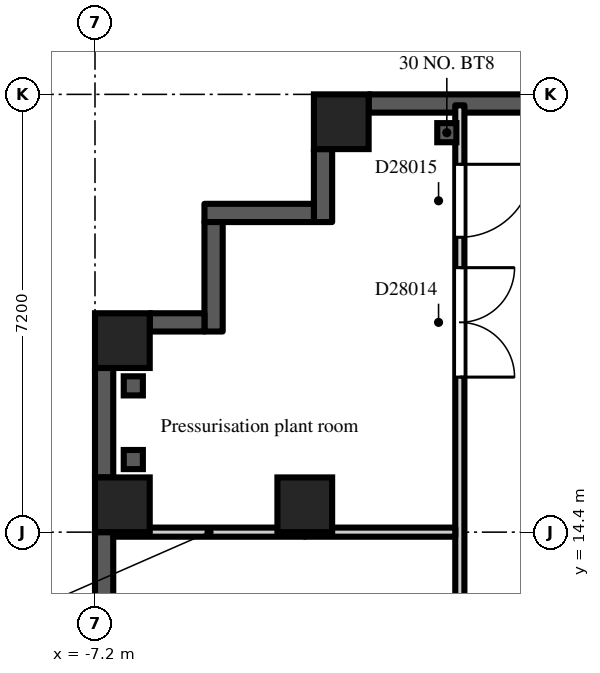
"""IFC4 building model, lengths in metres.
Left out: names, types, materials, properties, quantities, classifications, styles, units other than length and angle.
Written with IfcOpenShell. Run it as: python <this file> out.ifc"""

import sys

from ifc_helpers import new_model, si_unit, direction, frame, frame_2d, origin, origin_2d, place, context, subcontext, project, spatial, rectangle, extrude, element, fill, save


model = new_model("IFC4")
c1 = context("Model", 3, precision=1e-05, world=origin(), true_north=direction((0.0, 1.0)))
c2 = subcontext(c1, "Body", "Model", "MODEL_VIEW")
j1 = project(units=[si_unit("LENGTHUNIT", "METRE"), si_unit("PLANEANGLEUNIT", "RADIAN")], contexts=[c1])
p1 = place(None, origin())
s1 = spatial("IfcSite", under=j1, at=p1, CompositionType="ELEMENT")
p2 = place(p1, origin())
s2 = spatial("IfcBuilding", under=s1, at=p2, CompositionType="ELEMENT")
p3 = place(p2, frame((0.0, 0.0, 194.7)))
s3 = spatial("IfcBuildingStorey", under=s2, at=p3, CompositionType="ELEMENT", Elevation=194.7)
for number, where, z_axis, x_axis in (
    (1, (-6.75, 14.85, 0.0), (0.0, 0.0, 1.0), (1.0, 0.0, 0.0)),
    (2, (-6.75, 17.55, 0.0), (0.0, 0.0, 1.0), (1.0, 0.0, 0.0)),
    (3, (-3.75, 14.85, 0.0), (0.0, 0.0, 1.0), (1.0, 0.0, 0.0)),
    (4, (-3.15, 21.15, 0.0), (0.0, 0.0, 1.0), (1.0, 0.0, 0.0)),
):
    element("IfcColumn", number, at=place(p3, frame(where, z_axis=z_axis, x_axis=x_axis)), inside=s3, PredefinedType="COLUMN", context=c2, shape_type="SweptSolid", body=[
        extrude(rectangle(XDim=0.9, YDim=0.9, at=origin_2d()), origin(), (0.0, 0.0, 1.0), 4.2),
    ])
p4 = place(p3, frame((2.7, 21.45, 0.0), z_axis=(0.0, 0.0, 1.0), x_axis=(-1.0, 0.0, 0.0)))
e5 = element("IfcWall", 5, at=p4, inside=s3, PredefinedType="SOLIDWALL", context=c2, shape_type="SweptSolid", body=[
    extrude(rectangle(XDim=5.4, YDim=0.3, at=frame_2d((2.7, 0.0))), origin(), (0.0, 0.0, 1.0), 3.5),
])
p5 = place(p3, frame((-3.45, 20.7, 0.0), z_axis=(0.0, 0.0, 1.0), x_axis=(0.0, -1.0, 0.0)))
e6 = element("IfcWall", 6, at=p5, inside=s3, PredefinedType="SOLIDWALL", context=c2, shape_type="SweptSolid", body=[
    extrude(rectangle(XDim=1.2, YDim=0.3, at=frame_2d((0.6, 0.0))), origin(), (0.0, 0.0, 1.0), 3.8),
])
p6 = place(p3, frame((-3.6, 19.65, 0.0), z_axis=(0.0, 0.0, 1.0), x_axis=(-1.0, 0.0, 0.0)))
e7 = element("IfcWall", 7, at=p6, inside=s3, PredefinedType="SOLIDWALL", context=c2, shape_type="SweptSolid", body=[
    extrude(rectangle(XDim=1.8, YDim=0.3, at=frame_2d((0.9, 0.0))), origin(), (0.0, 0.0, 1.0), 3.8),
])
p7 = place(p3, frame((-5.25, 19.5, 0.0), z_axis=(0.0, 0.0, 1.0), x_axis=(0.0, -1.0, 0.0)))
e8 = element("IfcWall", 8, at=p7, inside=s3, PredefinedType="SOLIDWALL", context=c2, shape_type="SweptSolid", body=[
    extrude(rectangle(XDim=1.8, YDim=0.3, at=frame_2d((0.9, 0.0))), origin(), (0.0, 0.0, 1.0), 3.8),
])
p8 = place(p3, frame((-5.4, 17.85, 0.0), z_axis=(0.0, 0.0, 1.0), x_axis=(-1.0, 0.0, 0.0)))
e9 = element("IfcWall", 9, at=p8, inside=s3, PredefinedType="SOLIDWALL", context=c2, shape_type="SweptSolid", body=[
    extrude(rectangle(XDim=0.9, YDim=0.3, at=frame_2d((0.45, 0.0))), origin(), (0.0, 0.0, 1.0), 3.8),
])
p9 = place(p3, frame((-7.05, 17.1, 0.0), z_axis=(0.0, 0.0, 1.0), x_axis=(0.0, -1.0, 0.0)))
e10 = element("IfcWall", 10, at=p9, inside=s3, PredefinedType="SOLIDWALL", context=c2, shape_type="SweptSolid", body=[
    extrude(rectangle(XDim=1.8, YDim=0.3, at=frame_2d((0.9, 0.0))), origin(), (0.0, 0.0, 1.0), 3.5),
])
p10 = place(p3, frame((-7.05, 14.4, 0.0), z_axis=(0.0, 0.0, 1.0), x_axis=(0.0, -1.0, 0.0)))
e11 = element("IfcWall", 11, at=p10, inside=s3, PredefinedType="SOLIDWALL", context=c2, shape_type="SweptSolid", body=[
    extrude(rectangle(XDim=7.5, YDim=0.3, at=frame_2d((3.75, 0.0))), origin(), (0.0, 0.0, 1.0), 3.8),
])
p11 = place(p3, frame((-6.9, 14.4, 0.0), z_axis=(0.0, 0.0, 1.0), x_axis=(1.0, 0.0, 0.0)))
e12 = element("IfcWall", 12, at=p11, inside=s3, PredefinedType="PARTITIONING", context=c2, shape_type="SweptSolid", body=[
    extrude(rectangle(XDim=3.15, YDim=0.15, at=frame_2d((1.575, 0.0))), origin(), (0.0, 0.0, 1.0), 3.5),
])
p12 = place(p3, frame((-1.2, 1.125, 0.0), z_axis=(0.0, 0.0, 1.0), x_axis=(0.0, 1.0, 0.0)))
e13 = element("IfcWall", 13, at=p12, inside=s3, PredefinedType="PARTITIONING", context=c2, shape_type="SweptSolid", body=[
    extrude(rectangle(XDim=20.295, YDim=0.15, at=frame_2d((10.147, 0.0))), origin(), (0.0, 0.0, 1.0), 3.8),
])
p13 = place(p12, frame((4.025, 0.0, 0.0)))
e14 = element("IfcOpeningElement", 14, at=p13, cuts=e13, PredefinedType="OPENING", context=c2, shape_type="SweptSolid", body=[
    extrude(rectangle(XDim=1.2, YDim=2.1, at=frame_2d((0.6, 1.05))), frame((0.0, 0.085, 0.0), z_axis=(0.0, -1.0, 0.0), x_axis=(1.0, 0.0, 0.0)), (0.0, 0.0, 1.0), 0.17),
])
p14 = place(p12, frame((8.775, 0.0, 0.0)))
e15 = element("IfcOpeningElement", 15, at=p14, cuts=e13, PredefinedType="OPENING", context=c2, shape_type="SweptSolid", body=[
    extrude(rectangle(XDim=1.8, YDim=2.1, at=frame_2d((0.9, 1.05))), frame((0.0, 0.085, 0.0), z_axis=(0.0, -1.0, 0.0), x_axis=(1.0, 0.0, 0.0)), (0.0, 0.0, 1.0), 0.17),
])
p15 = place(p12, frame((15.825, 0.0, 0.0)))
e16 = element("IfcOpeningElement", 16, at=p15, cuts=e13, PredefinedType="OPENING", context=c2, shape_type="SweptSolid", body=[
    extrude(rectangle(XDim=1.8, YDim=2.1, at=frame_2d((0.9, 1.05))), frame((0.0, 0.085, 0.0), z_axis=(0.0, -1.0, 0.0), x_axis=(1.0, 0.0, 0.0)), (0.0, 0.0, 1.0), 0.17),
])
p16 = place(p12, frame((18.125, 0.0, 0.0)))
e17 = element("IfcOpeningElement", 17, at=p16, cuts=e13, PredefinedType="OPENING", context=c2, shape_type="SweptSolid", body=[
    extrude(rectangle(XDim=1.2, YDim=2.1, at=frame_2d((0.6, 1.05))), frame((0.0, 0.085, 0.0), z_axis=(0.0, -1.0, 0.0), x_axis=(1.0, 0.0, 0.0)), (0.0, 0.0, 1.0), 0.17),
])
p17 = place(p3, frame((-3.75, 14.4, 0.0), z_axis=(0.0, 0.0, 1.0), x_axis=(1.0, 0.0, 0.0)))
e18 = element("IfcWall", 18, at=p17, inside=s3, PredefinedType="PARTITIONING", context=c2, shape_type="SweptSolid", body=[
    extrude(rectangle(XDim=2.475, YDim=0.15, at=frame_2d((1.238, 0.0))), origin(), (0.0, 0.0, 1.0), 3.8),
])
p18 = place(p15, frame((1.8, 0.0, 0.0), z_axis=(0.0, 0.0, 1.0), x_axis=(-1.0, 0.0, 0.0)))
e19 = element("IfcDoor", 19, at=p18, inside=s3, OperationType="DOUBLE_DOOR_DOUBLE_SWING", PredefinedType="DOOR", context=c2, shape_type="SweptSolid", body=[
    extrude(rectangle(XDim=1.8, YDim=2.1, at=frame_2d((0.9, 1.05))), frame((0.0, 0.025, 0.0), z_axis=(0.0, -1.0, 0.0), x_axis=(1.0, 0.0, 0.0)), (0.0, 0.0, 1.0), 0.05),
])
fill(e16, e19)
p19 = place(p16, frame((1.2, 0.0, 0.0), z_axis=(0.0, 0.0, 1.0), x_axis=(-1.0, 0.0, 0.0)))
e20 = element("IfcDoor", 20, at=p19, inside=s3, OperationType="SINGLE_SWING_LEFT", PredefinedType="DOOR", context=c2, shape_type="SweptSolid", body=[
    extrude(rectangle(XDim=1.2, YDim=2.1, at=frame_2d((0.6, 1.05))), frame((0.0, 0.025, 0.0), z_axis=(0.0, -1.0, 0.0), x_axis=(1.0, 0.0, 0.0)), (0.0, 0.0, 1.0), 0.05),
])
fill(e17, e20)
save(model, sys.argv[1])
